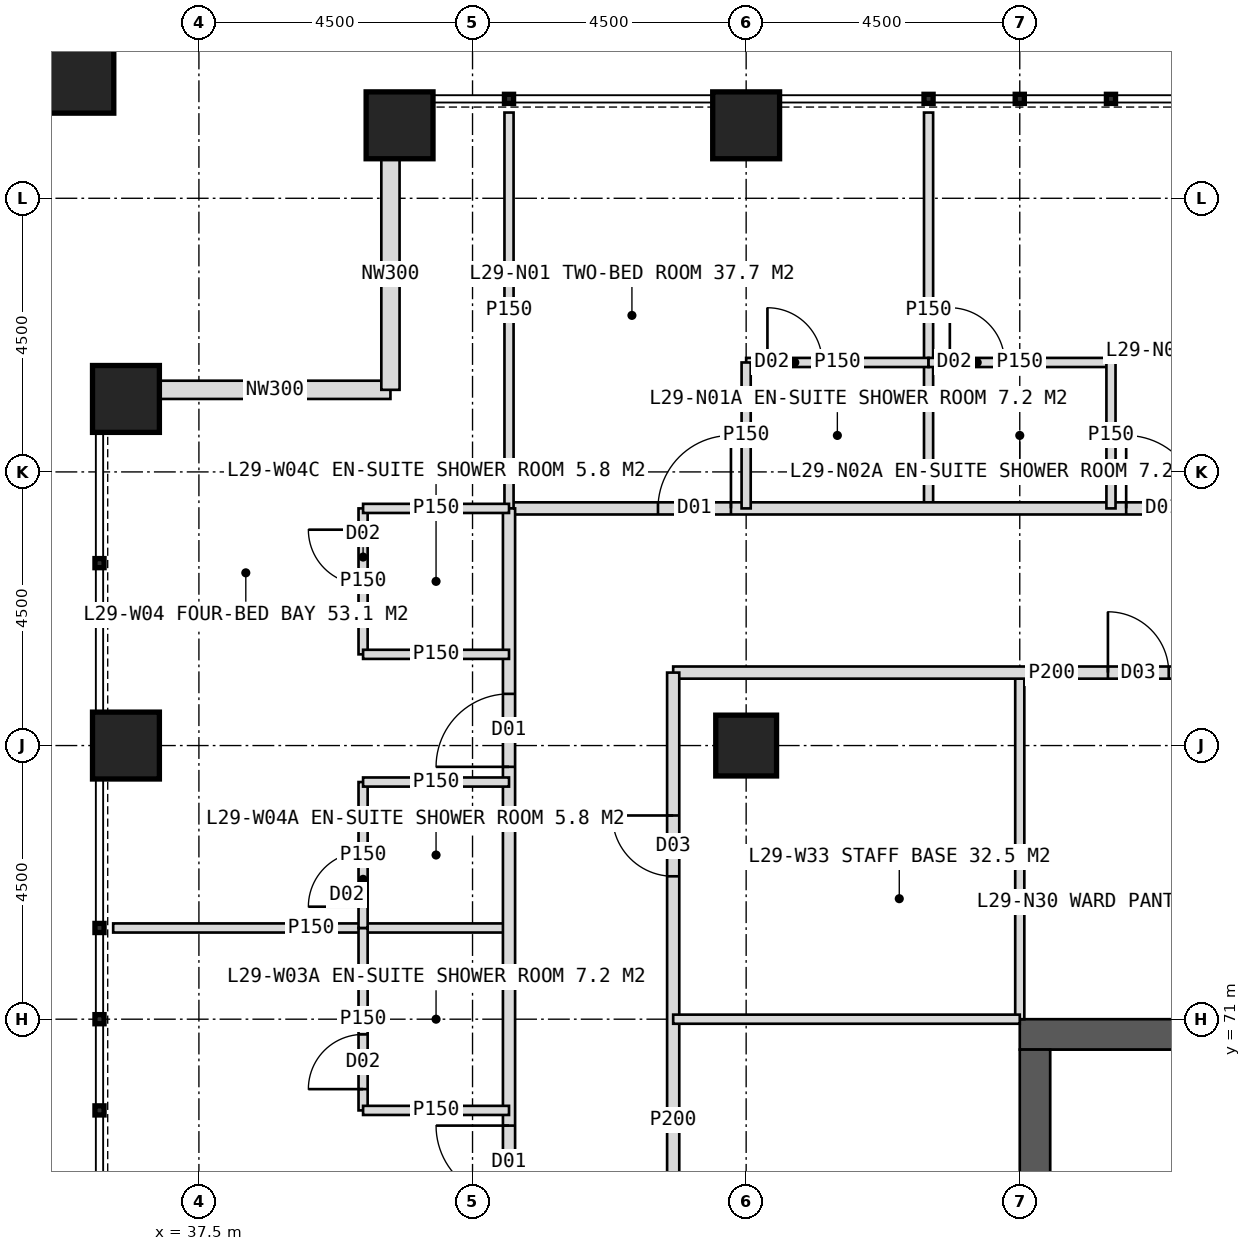
"""IFC4 building model, lengths in metres.
Left out: names, types, materials, properties, quantities, classifications, styles, units other than length and angle.
Written with IfcOpenShell. Run it as: python <this file> out.ifc"""

import sys

from ifc_helpers import new_model, si_unit, direction, frame, frame_2d, origin, origin_2d, place, context, subcontext, project, spatial, rectangle, hollow_rectangle, extrude, element, fill, save


model = new_model("IFC4")
c1 = context("Model", 3, precision=1e-05, world=origin(), true_north=direction((0.0, 1.0)))
c2 = subcontext(c1, "Body", "Model", "MODEL_VIEW")
j1 = project(units=[si_unit("LENGTHUNIT", "METRE"), si_unit("PLANEANGLEUNIT", "RADIAN")], contexts=[c1])
p1 = place(None, origin())
s1 = spatial("IfcSite", under=j1, at=p1, CompositionType="ELEMENT")
p2 = place(p1, origin())
s2 = spatial("IfcBuilding", under=s1, at=p2, CompositionType="ELEMENT")
p3 = place(p2, frame((0.0, 0.0, 124.0)))
s3 = spatial("IfcBuildingStorey", under=s2, at=p3, CompositionType="ELEMENT", Elevation=124.0)
p4 = place(p3, frame((51.0, 70.75, 0.0), z_axis=(0.0, 0.0, 1.0), x_axis=(1.0, 0.0, 0.0)))
e1 = element("IfcWall", 1, at=p4, inside=s3, PredefinedType="SHEAR", context=c2, shape_type="SweptSolid", body=[
    extrude(rectangle(XDim=18.0, YDim=0.5, at=frame_2d((9.0, 0.0))), origin(), (0.0, 0.0, 1.0), 4.0),
])
p5 = place(p4, frame((8.1, 0.0, 0.0)))
e2 = element("IfcOpeningElement", 2, at=p5, cuts=e1, PredefinedType="OPENING", context=c2, shape_type="SweptSolid", body=[
    extrude(rectangle(XDim=1.8, YDim=2.2, at=frame_2d((0.9, 1.1))), frame((0.0, 0.26, 0.0), z_axis=(0.0, -1.0, 0.0), x_axis=(1.0, 0.0, 0.0)), (0.0, 0.0, 1.0), 0.52),
])
p6 = place(p3, frame((51.25, 53.5, 0.0), z_axis=(0.0, 0.0, 1.0), x_axis=(0.0, 1.0, 0.0)))
e3 = element("IfcWall", 3, at=p6, inside=s3, PredefinedType="SHEAR", context=c2, shape_type="SweptSolid", body=[
    extrude(rectangle(XDim=17.0, YDim=0.5, at=frame_2d((8.5, 0.0))), origin(), (0.0, 0.0, 1.0), 4.0),
])
p7 = place(p6, frame((6.0, 0.0, 0.0)))
e4 = element("IfcOpeningElement", 4, at=p7, cuts=e3, PredefinedType="OPENING", context=c2, shape_type="SweptSolid", body=[
    extrude(rectangle(XDim=1.5, YDim=2.2, at=frame_2d((0.75, 1.1))), frame((0.0, 0.26, 0.0), z_axis=(0.0, -1.0, 0.0), x_axis=(1.0, 0.0, 0.0)), (0.0, 0.0, 1.0), 0.52),
])
p8 = place(p3, frame((46.5, 75.5, 0.0), z_axis=(0.0, 0.0, 1.0), x_axis=(1.0, 0.0, 0.0)))
e5 = element("IfcColumn", 5, at=p8, inside=s3, PredefinedType="COLUMN", context=c2, shape_type="SweptSolid", body=[
    extrude(hollow_rectangle(XDim=1.0, YDim=1.0, WallThickness=0.1, at=origin_2d()), origin(), (0.0, 0.0, 1.0), 4.0),
])
for number, where, z_axis, x_axis in (
    (6, (40.8, 85.7, 0.0), (0.0, 0.0, 1.0), (1.0, 0.0, 0.0)),
    (7, (46.5, 85.7, 0.0), (0.0, 0.0, 1.0), (1.0, 0.0, 0.0)),
    (8, (36.3, 75.5, 0.0), (0.0, 0.0, 1.0), (1.0, 0.0, 0.0)),
    (9, (36.3, 81.2, 0.0), (0.0, 0.0, 1.0), (1.0, 0.0, 0.0)),
):
    element("IfcColumn", number, at=place(p3, frame(where, z_axis=z_axis, x_axis=x_axis)), inside=s3, PredefinedType="COLUMN", context=c2, shape_type="SweptSolid", body=[
        extrude(hollow_rectangle(XDim=1.1, YDim=1.1, WallThickness=0.1, at=origin_2d()), origin(), (0.0, 0.0, 1.0), 4.0),
    ])
p9 = place(p3, frame((35.4, 86.6, 0.0), z_axis=(0.0, 0.0, 1.0), x_axis=(1.0, 0.0, 0.0)))
e10 = element("IfcColumn", 10, at=p9, inside=s3, PredefinedType="COLUMN", context=c2, shape_type="SweptSolid", body=[
    extrude(hollow_rectangle(XDim=1.4, YDim=1.4, WallThickness=0.08, at=origin_2d()), origin(), (0.0, 0.0, 1.0), 4.0),
])
for number, where, z_axis, x_axis in (
    (11, (36.85, 81.35, 0.0), (0.0, 0.0, 1.0), (1.0, 0.0, 0.0)),
    (12, (40.65, 81.35, 0.0), (0.0, 0.0, 1.0), (0.0, 1.0, 0.0)),
):
    element("IfcWall", number, at=place(p3, frame(where, z_axis=z_axis, x_axis=x_axis)), inside=s3, PredefinedType="ELEMENTEDWALL", context=c2, shape_type="SweptSolid", body=[
        extrude(rectangle(XDim=3.8, YDim=0.3, at=frame_2d((1.9, 0.0))), origin(), (0.0, 0.0, 1.0), 4.0),
    ])
p10 = place(p3, frame((49.5, 79.4, 0.0), z_axis=(0.0, 0.0, 1.0), x_axis=(0.0, 1.0, 0.0)))
e13 = element("IfcWall", 13, at=p10, inside=s3, PredefinedType="PARTITIONING", context=c2, shape_type="SweptSolid", body=[
    extrude(rectangle(XDim=6.51, YDim=0.15, at=frame_2d((3.255, 0.0))), origin(), (0.0, 0.0, 1.0), 3.75),
])
p11 = place(p3, frame((42.6, 79.4, 0.0), z_axis=(0.0, 0.0, 1.0), x_axis=(1.0, 0.0, 0.0)))
e14 = element("IfcWall", 14, at=p11, inside=s3, PredefinedType="PARTITIONING", context=c2, shape_type="SweptSolid", body=[
    extrude(rectangle(XDim=34.8, YDim=0.2, at=frame_2d((17.4, 0.0))), origin(), (0.0, 0.0, 1.0), 3.75),
])
p12 = place(p11, frame((2.45, 0.0, 0.0)))
e15 = element("IfcOpeningElement", 15, at=p12, cuts=e14, PredefinedType="OPENING", context=c2, shape_type="SweptSolid", body=[
    extrude(rectangle(XDim=1.2, YDim=2.2, at=frame_2d((0.6, 1.1))), frame((0.0, 0.11, 0.0), z_axis=(0.0, -1.0, 0.0), x_axis=(1.0, 0.0, 0.0)), (0.0, 0.0, 1.0), 0.22),
])
p13 = place(p11, frame((10.15, 0.0, 0.0)))
e16 = element("IfcOpeningElement", 16, at=p13, cuts=e14, PredefinedType="OPENING", context=c2, shape_type="SweptSolid", body=[
    extrude(rectangle(XDim=1.2, YDim=2.2, at=frame_2d((0.6, 1.1))), frame((0.0, 0.11, 0.0), z_axis=(0.0, -1.0, 0.0), x_axis=(1.0, 0.0, 0.0)), (0.0, 0.0, 1.0), 0.22),
])
p14 = place(p11, frame((19.8, 0.0, 0.0)))
e17 = element("IfcOpeningElement", 17, at=p14, cuts=e14, PredefinedType="OPENING", context=c2, shape_type="SweptSolid", body=[
    extrude(rectangle(XDim=1.2, YDim=2.2, at=frame_2d((0.6, 1.1))), frame((0.0, 0.11, 0.0), z_axis=(0.0, -1.0, 0.0), x_axis=(1.0, 0.0, 0.0)), (0.0, 0.0, 1.0), 0.22),
])
p15 = place(p11, frame((27.55, 0.0, 0.0)))
e18 = element("IfcOpeningElement", 18, at=p15, cuts=e14, PredefinedType="OPENING", context=c2, shape_type="SweptSolid", body=[
    extrude(rectangle(XDim=1.2, YDim=2.2, at=frame_2d((0.6, 1.1))), frame((0.0, 0.11, 0.0), z_axis=(0.0, -1.0, 0.0), x_axis=(1.0, 0.0, 0.0)), (0.0, 0.0, 1.0), 0.22),
])
p16 = place(p3, frame((42.6, 79.4, 0.0), z_axis=(0.0, 0.0, 1.0), x_axis=(0.0, 1.0, 0.0)))
e19 = element("IfcWall", 19, at=p16, inside=s3, PredefinedType="PARTITIONING", context=c2, shape_type="SweptSolid", body=[
    extrude(rectangle(XDim=6.51, YDim=0.15, at=frame_2d((3.255, 0.0))), origin(), (0.0, 0.0, 1.0), 3.75),
])
p17 = place(p3, frame((46.5, 81.8, 0.0), z_axis=(0.0, 0.0, 1.0), x_axis=(1.0, 0.0, 0.0)))
e20 = element("IfcWall", 20, at=p17, inside=s3, PredefinedType="PARTITIONING", context=c2, shape_type="SweptSolid", body=[
    extrude(rectangle(XDim=3.0, YDim=0.15, at=frame_2d((1.5, 0.0))), origin(), (0.0, 0.0, 1.0), 3.75),
])
p18 = place(p17, frame((0.35, 0.0, 0.0)))
e21 = element("IfcOpeningElement", 21, at=p18, cuts=e20, PredefinedType="OPENING", context=c2, shape_type="SweptSolid", body=[
    extrude(rectangle(XDim=0.9, YDim=2.1, at=frame_2d((0.45, 1.05))), frame((0.0, 0.085, 0.0), z_axis=(0.0, -1.0, 0.0), x_axis=(1.0, 0.0, 0.0)), (0.0, 0.0, 1.0), 0.17),
])
p19 = place(p3, frame((46.5, 79.4, 0.0), z_axis=(0.0, 0.0, 1.0), x_axis=(0.0, 1.0, 0.0)))
e22 = element("IfcWall", 22, at=p19, inside=s3, PredefinedType="PARTITIONING", context=c2, shape_type="SweptSolid", body=[
    extrude(rectangle(XDim=2.4, YDim=0.15, at=frame_2d((1.2, 0.0))), origin(), (0.0, 0.0, 1.0), 2.95),
])
p20 = place(p3, frame((49.5, 81.8, 0.0), z_axis=(0.0, 0.0, 1.0), x_axis=(1.0, 0.0, 0.0)))
e23 = element("IfcWall", 23, at=p20, inside=s3, PredefinedType="PARTITIONING", context=c2, shape_type="SweptSolid", body=[
    extrude(rectangle(XDim=3.0, YDim=0.15, at=frame_2d((1.5, 0.0))), origin(), (0.0, 0.0, 1.0), 3.75),
])
p21 = place(p20, frame((0.35, 0.0, 0.0)))
e24 = element("IfcOpeningElement", 24, at=p21, cuts=e23, PredefinedType="OPENING", context=c2, shape_type="SweptSolid", body=[
    extrude(rectangle(XDim=0.9, YDim=2.1, at=frame_2d((0.45, 1.05))), frame((0.0, 0.085, 0.0), z_axis=(0.0, -1.0, 0.0), x_axis=(1.0, 0.0, 0.0)), (0.0, 0.0, 1.0), 0.17),
])
p22 = place(p3, frame((52.5, 79.4, 0.0), z_axis=(0.0, 0.0, 1.0), x_axis=(0.0, 1.0, 0.0)))
e25 = element("IfcWall", 25, at=p22, inside=s3, PredefinedType="PARTITIONING", context=c2, shape_type="SweptSolid", body=[
    extrude(rectangle(XDim=2.4, YDim=0.15, at=frame_2d((1.2, 0.0))), origin(), (0.0, 0.0, 1.0), 3.75),
])
p23 = place(p3, frame((51.0, 71.0, 0.0), z_axis=(0.0, 0.0, 1.0), x_axis=(0.0, 1.0, 0.0)))
e26 = element("IfcWall", 26, at=p23, inside=s3, PredefinedType="PARTITIONING", context=c2, shape_type="SweptSolid", body=[
    extrude(rectangle(XDim=5.7, YDim=0.15, at=frame_2d((2.85, 0.0))), origin(), (0.0, 0.0, 1.0), 3.75),
])
p24 = place(p3, frame((45.3, 76.7, 0.0), z_axis=(0.0, 0.0, 1.0), x_axis=(1.0, 0.0, 0.0)))
e27 = element("IfcWall", 27, at=p24, inside=s3, PredefinedType="PARTITIONING", context=c2, shape_type="SweptSolid", body=[
    extrude(rectangle(XDim=12.45, YDim=0.2, at=frame_2d((6.225, 0.0))), origin(), (0.0, 0.0, 1.0), 3.75),
])
p25 = place(p24, frame((7.15, 0.0, 0.0)))
e28 = element("IfcOpeningElement", 28, at=p25, cuts=e27, PredefinedType="OPENING", context=c2, shape_type="SweptSolid", body=[
    extrude(rectangle(XDim=1.0, YDim=2.1, at=frame_2d((0.5, 1.05))), frame((0.0, 0.11, 0.0), z_axis=(0.0, -1.0, 0.0), x_axis=(1.0, 0.0, 0.0)), (0.0, 0.0, 1.0), 0.22),
])
p26 = place(p3, frame((42.6, 72.5, 0.0), z_axis=(0.0, 0.0, 1.0), x_axis=(-1.0, 0.0, 0.0)))
e29 = element("IfcWall", 29, at=p26, inside=s3, PredefinedType="PARTITIONING", context=c2, shape_type="SweptSolid", body=[
    extrude(rectangle(XDim=6.51, YDim=0.15, at=frame_2d((3.255, 0.0))), origin(), (0.0, 0.0, 1.0), 3.75),
])
p27 = place(p3, frame((42.6, 44.6, 0.0), z_axis=(0.0, 0.0, 1.0), x_axis=(0.0, 1.0, 0.0)))
e30 = element("IfcWall", 30, at=p27, inside=s3, PredefinedType="PARTITIONING", context=c2, shape_type="SweptSolid", body=[
    extrude(rectangle(XDim=34.8, YDim=0.2, at=frame_2d((17.4, 0.0))), origin(), (0.0, 0.0, 1.0), 3.75),
])
p28 = place(p27, frame((2.45, 0.0, 0.0)))
e31 = element("IfcOpeningElement", 31, at=p28, cuts=e30, PredefinedType="OPENING", context=c2, shape_type="SweptSolid", body=[
    extrude(rectangle(XDim=1.2, YDim=2.2, at=frame_2d((0.6, 1.1))), frame((0.0, 0.11, 0.0), z_axis=(0.0, -1.0, 0.0), x_axis=(1.0, 0.0, 0.0)), (0.0, 0.0, 1.0), 0.22),
])
p29 = place(p27, frame((10.15, 0.0, 0.0)))
e32 = element("IfcOpeningElement", 32, at=p29, cuts=e30, PredefinedType="OPENING", context=c2, shape_type="SweptSolid", body=[
    extrude(rectangle(XDim=1.2, YDim=2.2, at=frame_2d((0.6, 1.1))), frame((0.0, 0.11, 0.0), z_axis=(0.0, -1.0, 0.0), x_axis=(1.0, 0.0, 0.0)), (0.0, 0.0, 1.0), 0.22),
])
p30 = place(p27, frame((23.45, 0.0, 0.0)))
e33 = element("IfcOpeningElement", 33, at=p30, cuts=e30, PredefinedType="OPENING", context=c2, shape_type="SweptSolid", body=[
    extrude(rectangle(XDim=1.2, YDim=2.2, at=frame_2d((0.6, 1.1))), frame((0.0, 0.11, 0.0), z_axis=(0.0, -1.0, 0.0), x_axis=(1.0, 0.0, 0.0)), (0.0, 0.0, 1.0), 0.22),
])
p31 = place(p27, frame((30.55, 0.0, 0.0)))
e34 = element("IfcOpeningElement", 34, at=p31, cuts=e30, PredefinedType="OPENING", context=c2, shape_type="SweptSolid", body=[
    extrude(rectangle(XDim=1.2, YDim=2.2, at=frame_2d((0.6, 1.1))), frame((0.0, 0.11, 0.0), z_axis=(0.0, -1.0, 0.0), x_axis=(1.0, 0.0, 0.0)), (0.0, 0.0, 1.0), 0.22),
])
p32 = place(p3, frame((40.2, 69.5, 0.0), z_axis=(0.0, 0.0, 1.0), x_axis=(0.0, 1.0, 0.0)))
e35 = element("IfcWall", 35, at=p32, inside=s3, PredefinedType="PARTITIONING", context=c2, shape_type="SweptSolid", body=[
    extrude(rectangle(XDim=3.0, YDim=0.15, at=frame_2d((1.5, 0.0))), origin(), (0.0, 0.0, 1.0), 3.75),
])
p33 = place(p32, frame((0.35, 0.0, 0.0)))
e36 = element("IfcOpeningElement", 36, at=p33, cuts=e35, PredefinedType="OPENING", context=c2, shape_type="SweptSolid", body=[
    extrude(rectangle(XDim=0.9, YDim=2.1, at=frame_2d((0.45, 1.05))), frame((0.0, 0.085, 0.0), z_axis=(0.0, -1.0, 0.0), x_axis=(1.0, 0.0, 0.0)), (0.0, 0.0, 1.0), 0.17),
])
p34 = place(p3, frame((42.6, 69.5, 0.0), z_axis=(0.0, 0.0, 1.0), x_axis=(-1.0, 0.0, 0.0)))
e37 = element("IfcWall", 37, at=p34, inside=s3, PredefinedType="PARTITIONING", context=c2, shape_type="SweptSolid", body=[
    extrude(rectangle(XDim=2.4, YDim=0.15, at=frame_2d((1.2, 0.0))), origin(), (0.0, 0.0, 1.0), 3.75),
])
p35 = place(p3, frame((40.2, 72.5, 0.0), z_axis=(0.0, 0.0, 1.0), x_axis=(0.0, 1.0, 0.0)))
e38 = element("IfcWall", 38, at=p35, inside=s3, PredefinedType="PARTITIONING", context=c2, shape_type="SweptSolid", body=[
    extrude(rectangle(XDim=2.4, YDim=0.15, at=frame_2d((1.2, 0.0))), origin(), (0.0, 0.0, 1.0), 3.75),
])
p36 = place(p35, frame((0.35, 0.0, 0.0)))
e39 = element("IfcOpeningElement", 39, at=p36, cuts=e38, PredefinedType="OPENING", context=c2, shape_type="SweptSolid", body=[
    extrude(rectangle(XDim=0.9, YDim=2.1, at=frame_2d((0.45, 1.05))), frame((0.0, 0.085, 0.0), z_axis=(0.0, -1.0, 0.0), x_axis=(1.0, 0.0, 0.0)), (0.0, 0.0, 1.0), 0.17),
])
p37 = place(p3, frame((42.6, 74.9, 0.0), z_axis=(0.0, 0.0, 1.0), x_axis=(-1.0, 0.0, 0.0)))
e40 = element("IfcWall", 40, at=p37, inside=s3, PredefinedType="PARTITIONING", context=c2, shape_type="SweptSolid", body=[
    extrude(rectangle(XDim=2.4, YDim=0.15, at=frame_2d((1.2, 0.0))), origin(), (0.0, 0.0, 1.0), 3.75),
])
p38 = place(p3, frame((40.2, 77.0, 0.0), z_axis=(0.0, 0.0, 1.0), x_axis=(0.0, 1.0, 0.0)))
e41 = element("IfcWall", 41, at=p38, inside=s3, PredefinedType="PARTITIONING", context=c2, shape_type="SweptSolid", body=[
    extrude(rectangle(XDim=2.4, YDim=0.15, at=frame_2d((1.2, 0.0))), origin(), (0.0, 0.0, 1.0), 3.75),
])
p39 = place(p38, frame((1.15, 0.0, 0.0)))
e42 = element("IfcOpeningElement", 42, at=p39, cuts=e41, PredefinedType="OPENING", context=c2, shape_type="SweptSolid", body=[
    extrude(rectangle(XDim=0.9, YDim=2.1, at=frame_2d((0.45, 1.05))), frame((0.0, 0.085, 0.0), z_axis=(0.0, -1.0, 0.0), x_axis=(1.0, 0.0, 0.0)), (0.0, 0.0, 1.0), 0.17),
])
for number, where, z_axis, x_axis in (
    (43, (42.6, 77.0, 0.0), (0.0, 0.0, 1.0), (-1.0, 0.0, 0.0)),
    (44, (42.6, 79.4, 0.0), (0.0, 0.0, 1.0), (-1.0, 0.0, 0.0)),
):
    element("IfcWall", number, at=place(p3, frame(where, z_axis=z_axis, x_axis=x_axis)), inside=s3, PredefinedType="PARTITIONING", context=c2, shape_type="SweptSolid", body=[
        extrude(rectangle(XDim=2.4, YDim=0.15, at=frame_2d((1.2, 0.0))), origin(), (0.0, 0.0, 1.0), 3.75),
    ])
p40 = place(p3, frame((45.3, 62.0, 0.0), z_axis=(0.0, 0.0, 1.0), x_axis=(0.0, 1.0, 0.0)))
e45 = element("IfcWall", 45, at=p40, inside=s3, PredefinedType="PARTITIONING", context=c2, shape_type="SweptSolid", body=[
    extrude(rectangle(XDim=14.7, YDim=0.2, at=frame_2d((7.35, 0.0))), origin(), (0.0, 0.0, 1.0), 3.75),
])
p41 = place(p40, frame((1.45, 0.0, 0.0)))
e46 = element("IfcOpeningElement", 46, at=p41, cuts=e45, PredefinedType="OPENING", context=c2, shape_type="SweptSolid", body=[
    extrude(rectangle(XDim=1.0, YDim=2.1, at=frame_2d((0.5, 1.05))), frame((0.0, 0.11, 0.0), z_axis=(0.0, -1.0, 0.0), x_axis=(1.0, 0.0, 0.0)), (0.0, 0.0, 1.0), 0.22),
])
p42 = place(p40, frame((11.35, 0.0, 0.0)))
e47 = element("IfcOpeningElement", 47, at=p42, cuts=e45, PredefinedType="OPENING", context=c2, shape_type="SweptSolid", body=[
    extrude(rectangle(XDim=1.0, YDim=2.1, at=frame_2d((0.5, 1.05))), frame((0.0, 0.11, 0.0), z_axis=(0.0, -1.0, 0.0), x_axis=(1.0, 0.0, 0.0)), (0.0, 0.0, 1.0), 0.22),
])
p43 = place(p3, frame((51.0, 71.0, 0.0), z_axis=(0.0, 0.0, 1.0), x_axis=(-1.0, 0.0, 0.0)))
e48 = element("IfcWall", 48, at=p43, inside=s3, PredefinedType="PARTITIONING", context=c2, shape_type="SweptSolid", body=[
    extrude(rectangle(XDim=5.7, YDim=0.15, at=frame_2d((2.85, 0.0))), origin(), (0.0, 0.0, 1.0), 3.75),
])
p44 = place(p12, origin())
e49 = element("IfcDoor", 49, at=p44, inside=s3, OperationType="SINGLE_SWING_RIGHT", PredefinedType="DOOR", context=c2, shape_type="SweptSolid", body=[
    extrude(rectangle(XDim=1.2, YDim=2.2, at=frame_2d((0.6, 1.1))), frame((0.0, 0.025, 0.0), z_axis=(0.0, -1.0, 0.0), x_axis=(1.0, 0.0, 0.0)), (0.0, 0.0, 1.0), 0.05),
])
fill(e15, e49)
p45 = place(p18, origin())
e50 = element("IfcDoor", 50, at=p45, inside=s3, OperationType="SINGLE_SWING_LEFT", PredefinedType="DOOR", context=c2, shape_type="SweptSolid", body=[
    extrude(rectangle(XDim=0.9, YDim=2.1, at=frame_2d((0.45, 1.05))), frame((0.0, 0.025, 0.0), z_axis=(0.0, -1.0, 0.0), x_axis=(1.0, 0.0, 0.0)), (0.0, 0.0, 1.0), 0.05),
])
fill(e21, e50)
p46 = place(p13, origin())
e51 = element("IfcDoor", 51, at=p46, inside=s3, OperationType="SINGLE_SWING_LEFT", PredefinedType="DOOR", context=c2, shape_type="SweptSolid", body=[
    extrude(rectangle(XDim=1.2, YDim=2.2, at=frame_2d((0.6, 1.1))), frame((0.0, 0.025, 0.0), z_axis=(0.0, -1.0, 0.0), x_axis=(1.0, 0.0, 0.0)), (0.0, 0.0, 1.0), 0.05),
])
fill(e16, e51)
p47 = place(p21, origin())
e52 = element("IfcDoor", 52, at=p47, inside=s3, OperationType="SINGLE_SWING_LEFT", PredefinedType="DOOR", context=c2, shape_type="SweptSolid", body=[
    extrude(rectangle(XDim=0.9, YDim=2.1, at=frame_2d((0.45, 1.05))), frame((0.0, 0.025, 0.0), z_axis=(0.0, -1.0, 0.0), x_axis=(1.0, 0.0, 0.0)), (0.0, 0.0, 1.0), 0.05),
])
fill(e24, e52)
p48 = place(p25, origin())
e53 = element("IfcDoor", 53, at=p48, inside=s3, OperationType="SINGLE_SWING_LEFT", PredefinedType="DOOR", context=c2, shape_type="SweptSolid", body=[
    extrude(rectangle(XDim=1.0, YDim=2.1, at=frame_2d((0.5, 1.05))), frame((0.0, 0.025, 0.0), z_axis=(0.0, -1.0, 0.0), x_axis=(1.0, 0.0, 0.0)), (0.0, 0.0, 1.0), 0.05),
])
fill(e28, e53)
p49 = place(p30, origin())
e54 = element("IfcDoor", 54, at=p49, inside=s3, OperationType="SINGLE_SWING_RIGHT", PredefinedType="DOOR", context=c2, shape_type="SweptSolid", body=[
    extrude(rectangle(XDim=1.2, YDim=2.2, at=frame_2d((0.6, 1.1))), frame((0.0, 0.025, 0.0), z_axis=(0.0, -1.0, 0.0), x_axis=(1.0, 0.0, 0.0)), (0.0, 0.0, 1.0), 0.05),
])
fill(e33, e54)
p50 = place(p33, origin())
e55 = element("IfcDoor", 55, at=p50, inside=s3, OperationType="SINGLE_SWING_LEFT", PredefinedType="DOOR", context=c2, shape_type="SweptSolid", body=[
    extrude(rectangle(XDim=0.9, YDim=2.1, at=frame_2d((0.45, 1.05))), frame((0.0, 0.025, 0.0), z_axis=(0.0, -1.0, 0.0), x_axis=(1.0, 0.0, 0.0)), (0.0, 0.0, 1.0), 0.05),
])
fill(e36, e55)
p51 = place(p31, origin())
e56 = element("IfcDoor", 56, at=p51, inside=s3, OperationType="SINGLE_SWING_LEFT", PredefinedType="DOOR", context=c2, shape_type="SweptSolid", body=[
    extrude(rectangle(XDim=1.2, YDim=2.2, at=frame_2d((0.6, 1.1))), frame((0.0, 0.025, 0.0), z_axis=(0.0, -1.0, 0.0), x_axis=(1.0, 0.0, 0.0)), (0.0, 0.0, 1.0), 0.05),
])
fill(e34, e56)
p52 = place(p36, origin())
e57 = element("IfcDoor", 57, at=p52, inside=s3, OperationType="SINGLE_SWING_LEFT", PredefinedType="DOOR", context=c2, shape_type="SweptSolid", body=[
    extrude(rectangle(XDim=0.9, YDim=2.1, at=frame_2d((0.45, 1.05))), frame((0.0, 0.025, 0.0), z_axis=(0.0, -1.0, 0.0), x_axis=(1.0, 0.0, 0.0)), (0.0, 0.0, 1.0), 0.05),
])
fill(e39, e57)
p53 = place(p39, origin())
e58 = element("IfcDoor", 58, at=p53, inside=s3, OperationType="SINGLE_SWING_RIGHT", PredefinedType="DOOR", context=c2, shape_type="SweptSolid", body=[
    extrude(rectangle(XDim=0.9, YDim=2.1, at=frame_2d((0.45, 1.05))), frame((0.0, 0.025, 0.0), z_axis=(0.0, -1.0, 0.0), x_axis=(1.0, 0.0, 0.0)), (0.0, 0.0, 1.0), 0.05),
])
fill(e42, e58)
p54 = place(p42, origin())
e59 = element("IfcDoor", 59, at=p54, inside=s3, OperationType="SINGLE_SWING_RIGHT", PredefinedType="DOOR", context=c2, shape_type="SweptSolid", body=[
    extrude(rectangle(XDim=1.0, YDim=2.1, at=frame_2d((0.5, 1.05))), frame((0.0, 0.025, 0.0), z_axis=(0.0, -1.0, 0.0), x_axis=(1.0, 0.0, 0.0)), (0.0, 0.0, 1.0), 0.05),
])
fill(e47, e59)
save(model, sys.argv[1])
